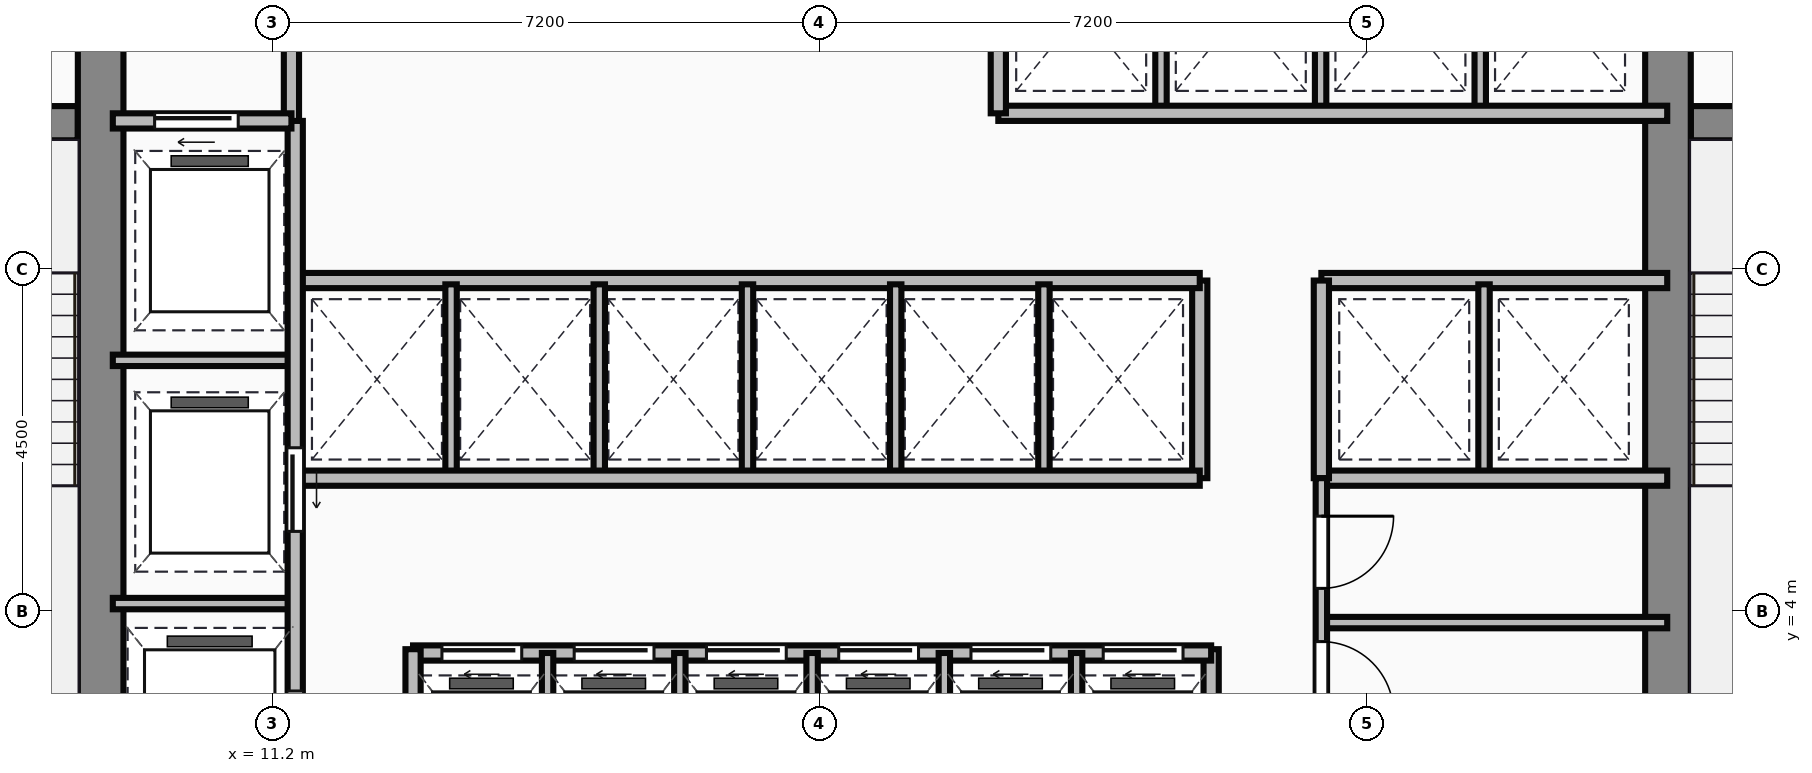
"""IFC4 building model, lengths in metres.
Left out: names, types, materials, properties, quantities, classifications, styles, units other than length and angle.
Written with IfcOpenShell. Run it as: python <this file> out.ifc"""

import sys

from ifc_helpers import new_model, si_unit, direction, frame, frame_2d, origin, place, context, subcontext, project, spatial, rectangle, extrude, source, transform, mapped, element, fill, save


model = new_model("IFC4")
c1 = context("Model", 3, precision=1e-05, world=origin(), true_north=direction((0.0, 1.0)))
c2 = subcontext(c1, "Body", "Model", "MODEL_VIEW")
j1 = project(units=[si_unit("LENGTHUNIT", "METRE"), si_unit("PLANEANGLEUNIT", "RADIAN")], contexts=[c1])
p1 = place(None, origin())
s1 = spatial("IfcSite", under=j1, at=p1, CompositionType="ELEMENT")
p2 = place(p1, origin())
s2 = spatial("IfcBuilding", under=s1, at=p2, CompositionType="ELEMENT")
p3 = place(p2, frame((0.0, 0.0, 61.7)))
s3 = spatial("IfcBuildingStorey", under=s2, at=p3, CompositionType="ELEMENT", Elevation=61.7)
m1 = source(origin(), c2, "Body", "SweptSolid", [
    extrude(rectangle(XDim=12.2, YDim=0.6, at=frame_2d((6.1, 0.0))), origin(), (0.0, 0.0, 1.0), 3.65),
])
for number, where, z_axis, x_axis in (
    (1, (8.94, 0.9, 0.0), (0.0, 0.0, 1.0), (0.0, 1.0, 0.0)),
    (2, (29.56, 0.9, 0.0), (0.0, 0.0, 1.0), (0.0, 1.0, 0.0)),
):
    element("IfcWall", number, at=place(p3, frame(where, z_axis=z_axis, x_axis=x_axis)), inside=s3, PredefinedType="SHEAR", context=c2, shape_type="MappedRepresentation", body=[
        mapped(m1, transform((0.0, 0.0, 0.0))),
    ])
m2 = source(origin(), c2, "Body", "SweptSolid", [
    extrude(rectangle(XDim=3.39, YDim=0.45, at=frame_2d((1.695, 0.0))), origin(), (0.0, 0.0, 1.0), 3.65),
])
p4 = place(p3, frame((5.25, 10.42, 0.0), z_axis=(0.0, 0.0, 1.0), x_axis=(1.0, 0.0, 0.0)))
e3 = element("IfcWall", 3, at=p4, inside=s3, PredefinedType="SHEAR", context=c2, shape_type="MappedRepresentation", body=[
    mapped(m2, transform((0.0, 0.0, 0.0))),
])
p5 = place(p4, frame((1.05, 0.0, 0.0)))
e4 = element("IfcOpeningElement", 4, at=p5, cuts=e3, PredefinedType="OPENING", context=c2, shape_type="SweptSolid", body=[
    extrude(rectangle(XDim=1.1, YDim=2.15, at=frame_2d((0.55, 1.075))), frame((0.0, 0.235, 0.0), z_axis=(0.0, -1.0, 0.0), x_axis=(1.0, 0.0, 0.0)), (0.0, 0.0, 1.0), 0.47),
])
p6 = place(p3, frame((29.86, 10.42, 0.0), z_axis=(0.0, 0.0, 1.0), x_axis=(1.0, 0.0, 0.0)))
e5 = element("IfcWall", 5, at=p6, inside=s3, PredefinedType="SHEAR", context=c2, shape_type="MappedRepresentation", body=[
    mapped(m2, transform((0.0, 0.0, 0.0))),
])
p7 = place(p6, frame((1.1, 0.0, 0.0)))
e6 = element("IfcOpeningElement", 6, at=p7, cuts=e5, PredefinedType="OPENING", context=c2, shape_type="SweptSolid", body=[
    extrude(rectangle(XDim=1.1, YDim=2.15, at=frame_2d((0.55, 1.075))), frame((0.0, 0.235, 0.0), z_axis=(0.0, -1.0, 0.0), x_axis=(1.0, 0.0, 0.0)), (0.0, 0.0, 1.0), 0.47),
])
m3 = source(origin(), c2, "Body", "SweptSolid", [
    extrude(rectangle(XDim=3.18, YDim=0.2, at=frame_2d((1.59, 0.0))), origin(), (0.0, 0.0, 1.0), 3.4),
])
p8 = place(p3, frame((11.45, 10.42, 0.0), z_axis=(0.0, 0.0, 1.0), x_axis=(0.0, 1.0, 0.0)))
e7 = element("IfcWall", 7, at=p8, inside=s3, PredefinedType="PARTITIONING", context=c2, shape_type="MappedRepresentation", body=[
    mapped(m3, transform((0.0, 0.0, 0.0))),
])
m4 = source(origin(), c2, "Body", "SweptSolid", [
    extrude(rectangle(XDim=2.35, YDim=0.2, at=frame_2d((1.175, 0.0))), origin(), (0.0, 0.0, 1.0), 3.4),
])
p9 = place(p3, frame((9.1, 10.45, 0.0), z_axis=(0.0, 0.0, 1.0), x_axis=(1.0, 0.0, 0.0)))
e8 = element("IfcWall", 8, at=p9, inside=s3, PredefinedType="PARTITIONING", context=c2, shape_type="MappedRepresentation", body=[
    mapped(m4, transform((0.0, 0.0, 0.0))),
])
p10 = place(p9, frame((0.55, 0.0, 0.0)))
e9 = element("IfcOpeningElement", 9, at=p10, cuts=e8, PredefinedType="OPENING", context=c2, shape_type="SweptSolid", body=[
    extrude(rectangle(XDim=1.1, YDim=2.15, at=frame_2d((0.55, 1.075))), frame((0.0, 0.11, 0.0), z_axis=(0.0, -1.0, 0.0), x_axis=(1.0, 0.0, 0.0)), (0.0, 0.0, 1.0), 0.22),
])
m5 = source(origin(), c2, "Body", "SweptSolid", [
    extrude(rectangle(XDim=9.6, YDim=0.2, at=frame_2d((4.8, 0.0))), origin(), (0.0, 0.0, 1.0), 3.4),
])
p11 = place(p3, frame((11.5, 0.85, 0.0), z_axis=(0.0, 0.0, 1.0), x_axis=(0.0, 1.0, 0.0)))
e10 = element("IfcWall", 10, at=p11, inside=s3, PredefinedType="PARTITIONING", context=c2, shape_type="MappedRepresentation", body=[
    mapped(m5, transform((0.0, 0.0, 0.0))),
])
p12 = place(p11, frame((4.2, 0.0, 0.0)))
e11 = element("IfcOpeningElement", 11, at=p12, cuts=e10, PredefinedType="OPENING", context=c2, shape_type="SweptSolid", body=[
    extrude(rectangle(XDim=1.1, YDim=2.15, at=frame_2d((0.55, 1.075))), frame((0.0, 0.11, 0.0), z_axis=(0.0, -1.0, 0.0), x_axis=(1.0, 0.0, 0.0)), (0.0, 0.0, 1.0), 0.22),
])
p13 = place(p11, frame((0.9, 0.0, 0.0)))
e12 = element("IfcOpeningElement", 12, at=p13, cuts=e10, PredefinedType="OPENING", context=c2, shape_type="SweptSolid", body=[
    extrude(rectangle(XDim=1.2, YDim=2.15, at=frame_2d((0.6, 1.075))), frame((0.0, 0.11, 0.0), z_axis=(0.0, -1.0, 0.0), x_axis=(1.0, 0.0, 0.0)), (0.0, 0.0, 1.0), 0.22),
])
m6 = source(origin(), c2, "Body", "SweptSolid", [
    extrude(rectangle(XDim=2.4, YDim=0.15, at=frame_2d((1.2, 0.0))), origin(), (0.0, 0.0, 1.0), 3.4),
])
for number, where, z_axis, x_axis in (
    (13, (9.1, 4.1, 0.0), (0.0, 0.0, 1.0), (1.0, 0.0, 0.0)),
    (14, (9.1, 7.3, 0.0), (0.0, 0.0, 1.0), (1.0, 0.0, 0.0)),
):
    element("IfcWall", number, at=place(p3, frame(where, z_axis=z_axis, x_axis=x_axis)), inside=s3, PredefinedType="PARTITIONING", context=c2, shape_type="MappedRepresentation", body=[
        mapped(m6, transform((0.0, 0.0, 0.0))),
    ])
m7 = source(origin(), c2, "Body", "SweptSolid", [
    extrude(rectangle(XDim=2.65, YDim=0.2, at=frame_2d((1.325, 0.0))), origin(), (0.0, 0.0, 1.0), 3.4),
])
p14 = place(p3, frame((13.05, 0.85, 0.0), z_axis=(0.0, 0.0, 1.0), x_axis=(0.0, 1.0, 0.0)))
e15 = element("IfcWall", 15, at=p14, inside=s3, PredefinedType="PARTITIONING", context=c2, shape_type="MappedRepresentation", body=[
    mapped(m7, transform((0.0, 0.0, 0.0))),
])
m8 = source(origin(), c2, "Body", "SweptSolid", [
    extrude(rectangle(XDim=10.5, YDim=0.2, at=frame_2d((5.25, 0.0))), origin(), (0.0, 0.0, 1.0), 3.4),
])
p15 = place(p3, frame((13.05, 3.45, 0.0), z_axis=(0.0, 0.0, 1.0), x_axis=(1.0, 0.0, 0.0)))
e16 = element("IfcWall", 16, at=p15, inside=s3, PredefinedType="PARTITIONING", context=c2, shape_type="MappedRepresentation", body=[
    mapped(m8, transform((0.0, 0.0, 0.0))),
])
p16 = place(p15, frame((0.38, 0.0, 0.0)))
e17 = element("IfcOpeningElement", 17, at=p16, cuts=e16, PredefinedType="OPENING", context=c2, shape_type="SweptSolid", body=[
    extrude(rectangle(XDim=1.05, YDim=2.15, at=frame_2d((0.525, 1.075))), frame((0.0, 0.11, 0.0), z_axis=(0.0, -1.0, 0.0), x_axis=(1.0, 0.0, 0.0)), (0.0, 0.0, 1.0), 0.22),
])
p17 = place(p15, frame((2.12, 0.0, 0.0)))
e18 = element("IfcOpeningElement", 18, at=p17, cuts=e16, PredefinedType="OPENING", context=c2, shape_type="SweptSolid", body=[
    extrude(rectangle(XDim=1.05, YDim=2.15, at=frame_2d((0.525, 1.075))), frame((0.0, 0.11, 0.0), z_axis=(0.0, -1.0, 0.0), x_axis=(1.0, 0.0, 0.0)), (0.0, 0.0, 1.0), 0.22),
])
p18 = place(p15, frame((3.86, 0.0, 0.0)))
e19 = element("IfcOpeningElement", 19, at=p18, cuts=e16, PredefinedType="OPENING", context=c2, shape_type="SweptSolid", body=[
    extrude(rectangle(XDim=1.05, YDim=2.15, at=frame_2d((0.525, 1.075))), frame((0.0, 0.11, 0.0), z_axis=(0.0, -1.0, 0.0), x_axis=(1.0, 0.0, 0.0)), (0.0, 0.0, 1.0), 0.22),
])
p19 = place(p15, frame((5.6, 0.0, 0.0)))
e20 = element("IfcOpeningElement", 20, at=p19, cuts=e16, PredefinedType="OPENING", context=c2, shape_type="SweptSolid", body=[
    extrude(rectangle(XDim=1.05, YDim=2.15, at=frame_2d((0.525, 1.075))), frame((0.0, 0.11, 0.0), z_axis=(0.0, -1.0, 0.0), x_axis=(1.0, 0.0, 0.0)), (0.0, 0.0, 1.0), 0.22),
])
p20 = place(p15, frame((7.34, 0.0, 0.0)))
e21 = element("IfcOpeningElement", 21, at=p20, cuts=e16, PredefinedType="OPENING", context=c2, shape_type="SweptSolid", body=[
    extrude(rectangle(XDim=1.05, YDim=2.15, at=frame_2d((0.525, 1.075))), frame((0.0, 0.11, 0.0), z_axis=(0.0, -1.0, 0.0), x_axis=(1.0, 0.0, 0.0)), (0.0, 0.0, 1.0), 0.22),
])
p21 = place(p15, frame((9.08, 0.0, 0.0)))
e22 = element("IfcOpeningElement", 22, at=p21, cuts=e16, PredefinedType="OPENING", context=c2, shape_type="SweptSolid", body=[
    extrude(rectangle(XDim=1.05, YDim=2.15, at=frame_2d((0.525, 1.075))), frame((0.0, 0.11, 0.0), z_axis=(0.0, -1.0, 0.0), x_axis=(1.0, 0.0, 0.0)), (0.0, 0.0, 1.0), 0.22),
])
p22 = place(p3, frame((23.55, 0.85, 0.0), z_axis=(0.0, 0.0, 1.0), x_axis=(0.0, 1.0, 0.0)))
e23 = element("IfcWall", 23, at=p22, inside=s3, PredefinedType="PARTITIONING", context=c2, shape_type="MappedRepresentation", body=[
    mapped(m7, transform((0.0, 0.0, 0.0))),
])
m9 = source(origin(), c2, "Body", "SweptSolid", [
    extrude(rectangle(XDim=2.6, YDim=0.15, at=frame_2d((1.3, 0.0))), origin(), (0.0, 0.0, 1.0), 3.4),
])
for number, where, z_axis, x_axis in (
    (24, (14.82, 0.85, 0.0), (0.0, 0.0, 1.0), (0.0, 1.0, 0.0)),
    (25, (16.56, 0.85, 0.0), (0.0, 0.0, 1.0), (0.0, 1.0, 0.0)),
    (26, (18.3, 0.85, 0.0), (0.0, 0.0, 1.0), (0.0, 1.0, 0.0)),
    (27, (20.04, 0.85, 0.0), (0.0, 0.0, 1.0), (0.0, 1.0, 0.0)),
    (28, (21.78, 0.85, 0.0), (0.0, 0.0, 1.0), (0.0, 1.0, 0.0)),
):
    element("IfcWall", number, at=place(p3, frame(where, z_axis=z_axis, x_axis=x_axis)), inside=s3, PredefinedType="PARTITIONING", context=c2, shape_type="MappedRepresentation", body=[
        mapped(m9, transform((0.0, 0.0, 0.0))),
    ])
m10 = source(origin(), c2, "Body", "SweptSolid", [
    extrude(rectangle(XDim=11.85, YDim=0.2, at=frame_2d((5.925, 0.0))), origin(), (0.0, 0.0, 1.0), 3.4),
])
for number, where, z_axis, x_axis in (
    (29, (11.55, 5.75, 0.0), (0.0, 0.0, 1.0), (1.0, 0.0, 0.0)),
    (30, (11.55, 8.35, 0.0), (0.0, 0.0, 1.0), (1.0, 0.0, 0.0)),
):
    element("IfcWall", number, at=place(p3, frame(where, z_axis=z_axis, x_axis=x_axis)), inside=s3, PredefinedType="PARTITIONING", context=c2, shape_type="MappedRepresentation", body=[
        mapped(m10, transform((0.0, 0.0, 0.0))),
    ])
m11 = source(origin(), c2, "Body", "SweptSolid", [
    extrude(rectangle(XDim=2.6, YDim=0.2, at=frame_2d((1.3, 0.0))), origin(), (0.0, 0.0, 1.0), 3.4),
])
p23 = place(p3, frame((23.4, 5.75, 0.0), z_axis=(0.0, 0.0, 1.0), x_axis=(0.0, 1.0, 0.0)))
e31 = element("IfcWall", 31, at=p23, inside=s3, PredefinedType="PARTITIONING", context=c2, shape_type="MappedRepresentation", body=[
    mapped(m11, transform((0.0, 0.0, 0.0))),
])
m12 = source(origin(), c2, "Body", "SweptSolid", [
    extrude(rectangle(XDim=2.5, YDim=0.15, at=frame_2d((1.25, 0.0))), origin(), (0.0, 0.0, 1.0), 3.4),
])
for number, where, z_axis, x_axis in (
    (32, (13.55, 5.8, 0.0), (0.0, 0.0, 1.0), (0.0, 1.0, 0.0)),
    (33, (15.5, 5.8, 0.0), (0.0, 0.0, 1.0), (0.0, 1.0, 0.0)),
    (34, (17.45, 5.8, 0.0), (0.0, 0.0, 1.0), (0.0, 1.0, 0.0)),
    (35, (19.4, 5.8, 0.0), (0.0, 0.0, 1.0), (0.0, 1.0, 0.0)),
    (36, (21.35, 5.8, 0.0), (0.0, 0.0, 1.0), (0.0, 1.0, 0.0)),
):
    element("IfcWall", number, at=place(p3, frame(where, z_axis=z_axis, x_axis=x_axis)), inside=s3, PredefinedType="PARTITIONING", context=c2, shape_type="MappedRepresentation", body=[
        mapped(m12, transform((0.0, 0.0, 0.0))),
    ])
m13 = source(origin(), c2, "Body", "SweptSolid", [
    extrude(rectangle(XDim=8.8, YDim=0.2, at=frame_2d((4.4, 0.0))), origin(), (0.0, 0.0, 1.0), 3.4),
])
p24 = place(p3, frame((20.75, 10.55, 0.0), z_axis=(0.0, 0.0, 1.0), x_axis=(1.0, 0.0, 0.0)))
e37 = element("IfcWall", 37, at=p24, inside=s3, PredefinedType="PARTITIONING", context=c2, shape_type="MappedRepresentation", body=[
    mapped(m13, transform((0.0, 0.0, 0.0))),
])
m14 = source(origin(), c2, "Body", "SweptSolid", [
    extrude(rectangle(XDim=3.0, YDim=0.2, at=frame_2d((1.5, 0.0))), origin(), (0.0, 0.0, 1.0), 3.4),
])
p25 = place(p3, frame((20.75, 10.55, 0.0), z_axis=(0.0, 0.0, 1.0), x_axis=(0.0, 1.0, 0.0)))
e38 = element("IfcWall", 38, at=p25, inside=s3, PredefinedType="PARTITIONING", context=c2, shape_type="MappedRepresentation", body=[
    mapped(m14, transform((0.0, 0.0, 0.0))),
])
m15 = source(origin(), c2, "Body", "SweptSolid", [
    extrude(rectangle(XDim=2.85, YDim=0.15, at=frame_2d((1.425, 0.0))), origin(), (0.0, 0.0, 1.0), 3.4),
])
for number, where, z_axis, x_axis in (
    (39, (22.89, 10.6, 0.0), (0.0, 0.0, 1.0), (0.0, 1.0, 0.0)),
    (40, (24.99, 10.6, 0.0), (0.0, 0.0, 1.0), (0.0, 1.0, 0.0)),
    (41, (27.09, 10.6, 0.0), (0.0, 0.0, 1.0), (0.0, 1.0, 0.0)),
):
    element("IfcWall", number, at=place(p3, frame(where, z_axis=z_axis, x_axis=x_axis)), inside=s3, PredefinedType="PARTITIONING", context=c2, shape_type="MappedRepresentation", body=[
        mapped(m15, transform((0.0, 0.0, 0.0))),
    ])
m16 = source(origin(), c2, "Body", "SweptSolid", [
    extrude(rectangle(XDim=4.55, YDim=0.2, at=frame_2d((2.275, 0.0))), origin(), (0.0, 0.0, 1.0), 3.4),
])
for number, where, z_axis, x_axis in (
    (42, (25.0, 8.35, 0.0), (0.0, 0.0, 1.0), (1.0, 0.0, 0.0)),
    (43, (25.0, 5.75, 0.0), (0.0, 0.0, 1.0), (1.0, 0.0, 0.0)),
):
    element("IfcWall", number, at=place(p3, frame(where, z_axis=z_axis, x_axis=x_axis)), inside=s3, PredefinedType="PARTITIONING", context=c2, shape_type="MappedRepresentation", body=[
        mapped(m16, transform((0.0, 0.0, 0.0))),
    ])
p26 = place(p3, frame((25.0, 5.75, 0.0), z_axis=(0.0, 0.0, 1.0), x_axis=(0.0, 1.0, 0.0)))
e44 = element("IfcWall", 44, at=p26, inside=s3, PredefinedType="PARTITIONING", context=c2, shape_type="MappedRepresentation", body=[
    mapped(m11, transform((0.0, 0.0, 0.0))),
])
p27 = place(p3, frame((27.14, 5.8, 0.0), z_axis=(0.0, 0.0, 1.0), x_axis=(0.0, 1.0, 0.0)))
e45 = element("IfcWall", 45, at=p27, inside=s3, PredefinedType="PARTITIONING", context=c2, shape_type="MappedRepresentation", body=[
    mapped(m12, transform((0.0, 0.0, 0.0))),
])
m17 = source(origin(), c2, "Body", "SweptSolid", [
    extrude(rectangle(XDim=4.9, YDim=0.15, at=frame_2d((2.45, 0.0))), origin(), (0.0, 0.0, 1.0), 3.4),
])
p28 = place(p3, frame((25.0, 0.85, 0.0), z_axis=(0.0, 0.0, 1.0), x_axis=(0.0, 1.0, 0.0)))
e46 = element("IfcWall", 46, at=p28, inside=s3, PredefinedType="PARTITIONING", context=c2, shape_type="MappedRepresentation", body=[
    mapped(m17, transform((0.0, 0.0, 0.0))),
])
p29 = place(p28, frame((1.8, 0.0, 0.0)))
e47 = element("IfcOpeningElement", 47, at=p29, cuts=e46, PredefinedType="OPENING", context=c2, shape_type="SweptSolid", body=[
    extrude(rectangle(XDim=0.95, YDim=2.15, at=frame_2d((0.475, 1.075))), frame((0.0, 0.085, 0.0), z_axis=(0.0, -1.0, 0.0), x_axis=(1.0, 0.0, 0.0)), (0.0, 0.0, 1.0), 0.17),
])
p30 = place(p28, frame((3.45, 0.0, 0.0)))
e48 = element("IfcOpeningElement", 48, at=p30, cuts=e46, PredefinedType="OPENING", context=c2, shape_type="SweptSolid", body=[
    extrude(rectangle(XDim=0.95, YDim=2.15, at=frame_2d((0.475, 1.075))), frame((0.0, 0.085, 0.0), z_axis=(0.0, -1.0, 0.0), x_axis=(1.0, 0.0, 0.0)), (0.0, 0.0, 1.0), 0.17),
])
m18 = source(origin(), c2, "Body", "SweptSolid", [
    extrude(rectangle(XDim=4.55, YDim=0.15, at=frame_2d((2.275, 0.0))), origin(), (0.0, 0.0, 1.0), 3.4),
])
p31 = place(p3, frame((25.0, 3.85, 0.0), z_axis=(0.0, 0.0, 1.0), x_axis=(1.0, 0.0, 0.0)))
e49 = element("IfcWall", 49, at=p31, inside=s3, PredefinedType="PARTITIONING", context=c2, shape_type="MappedRepresentation", body=[
    mapped(m18, transform((0.0, 0.0, 0.0))),
])
m19 = source(origin(), c2, "Body", "SweptSolid", [
    extrude(rectangle(XDim=1.1, YDim=2.15, at=frame_2d((0.55, 1.075))), frame((0.0, 0.025, 0.0), z_axis=(0.0, -1.0, 0.0), x_axis=(1.0, 0.0, 0.0)), (0.0, 0.0, 1.0), 0.05),
])
p32 = place(p10, origin())
e50 = element("IfcDoor", 50, at=p32, inside=s3, OperationType="SLIDING_TO_LEFT", PredefinedType="DOOR", context=c2, shape_type="MappedRepresentation", body=[
    mapped(m19, transform((0.0, 0.0, 0.0))),
])
fill(e9, e50)
p33 = place(p12, frame((1.1, 0.0, 0.0), z_axis=(0.0, 0.0, 1.0), x_axis=(-1.0, 0.0, 0.0)))
e51 = element("IfcDoor", 51, at=p33, inside=s3, OperationType="SLIDING_TO_LEFT", PredefinedType="DOOR", context=c2, shape_type="MappedRepresentation", body=[
    mapped(m19, transform((0.0, 0.0, 0.0))),
])
fill(e11, e51)
m20 = source(origin(), c2, "Body", "SweptSolid", [
    extrude(rectangle(XDim=1.2, YDim=2.15, at=frame_2d((0.6, 1.075))), frame((0.0, 0.025, 0.0), z_axis=(0.0, -1.0, 0.0), x_axis=(1.0, 0.0, 0.0)), (0.0, 0.0, 1.0), 0.05),
])
p34 = place(p13, frame((1.2, 0.0, 0.0), z_axis=(0.0, 0.0, 1.0), x_axis=(-1.0, 0.0, 0.0)))
e52 = element("IfcDoor", 52, at=p34, inside=s3, OperationType="SLIDING_TO_LEFT", PredefinedType="DOOR", context=c2, shape_type="MappedRepresentation", body=[
    mapped(m20, transform((0.0, 0.0, 0.0))),
])
fill(e12, e52)
m21 = source(origin(), c2, "Body", "SweptSolid", [
    extrude(rectangle(XDim=1.05, YDim=2.15, at=frame_2d((0.525, 1.075))), frame((0.0, 0.025, 0.0), z_axis=(0.0, -1.0, 0.0), x_axis=(1.0, 0.0, 0.0)), (0.0, 0.0, 1.0), 0.05),
])
p35 = place(p16, origin())
e53 = element("IfcDoor", 53, at=p35, inside=s3, OperationType="SLIDING_TO_LEFT", PredefinedType="DOOR", context=c2, shape_type="MappedRepresentation", body=[
    mapped(m21, transform((0.0, 0.0, 0.0))),
])
fill(e17, e53)
p36 = place(p17, origin())
e54 = element("IfcDoor", 54, at=p36, inside=s3, OperationType="SLIDING_TO_LEFT", PredefinedType="DOOR", context=c2, shape_type="MappedRepresentation", body=[
    mapped(m21, transform((0.0, 0.0, 0.0))),
])
fill(e18, e54)
p37 = place(p18, origin())
e55 = element("IfcDoor", 55, at=p37, inside=s3, OperationType="SLIDING_TO_LEFT", PredefinedType="DOOR", context=c2, shape_type="MappedRepresentation", body=[
    mapped(m21, transform((0.0, 0.0, 0.0))),
])
fill(e19, e55)
p38 = place(p19, origin())
e56 = element("IfcDoor", 56, at=p38, inside=s3, OperationType="SLIDING_TO_LEFT", PredefinedType="DOOR", context=c2, shape_type="MappedRepresentation", body=[
    mapped(m21, transform((0.0, 0.0, 0.0))),
])
fill(e20, e56)
p39 = place(p20, origin())
e57 = element("IfcDoor", 57, at=p39, inside=s3, OperationType="SLIDING_TO_LEFT", PredefinedType="DOOR", context=c2, shape_type="MappedRepresentation", body=[
    mapped(m21, transform((0.0, 0.0, 0.0))),
])
fill(e21, e57)
p40 = place(p21, origin())
e58 = element("IfcDoor", 58, at=p40, inside=s3, OperationType="SLIDING_TO_LEFT", PredefinedType="DOOR", context=c2, shape_type="MappedRepresentation", body=[
    mapped(m21, transform((0.0, 0.0, 0.0))),
])
fill(e22, e58)
m22 = source(origin(), c2, "Body", "SweptSolid", [
    extrude(rectangle(XDim=0.95, YDim=2.15, at=frame_2d((0.475, 1.075))), frame((0.0, 0.025, 0.0), z_axis=(0.0, -1.0, 0.0), x_axis=(1.0, 0.0, 0.0)), (0.0, 0.0, 1.0), 0.05),
])
p41 = place(p29, origin())
e59 = element("IfcDoor", 59, at=p41, inside=s3, OperationType="SINGLE_SWING_LEFT", PredefinedType="DOOR", context=c2, shape_type="MappedRepresentation", body=[
    mapped(m22, transform((0.0, 0.0, 0.0))),
])
fill(e47, e59)
p42 = place(p30, origin())
e60 = element("IfcDoor", 60, at=p42, inside=s3, OperationType="SINGLE_SWING_RIGHT", PredefinedType="DOOR", context=c2, shape_type="MappedRepresentation", body=[
    mapped(m22, transform((0.0, 0.0, 0.0))),
])
fill(e48, e60)
save(model, sys.argv[1])
